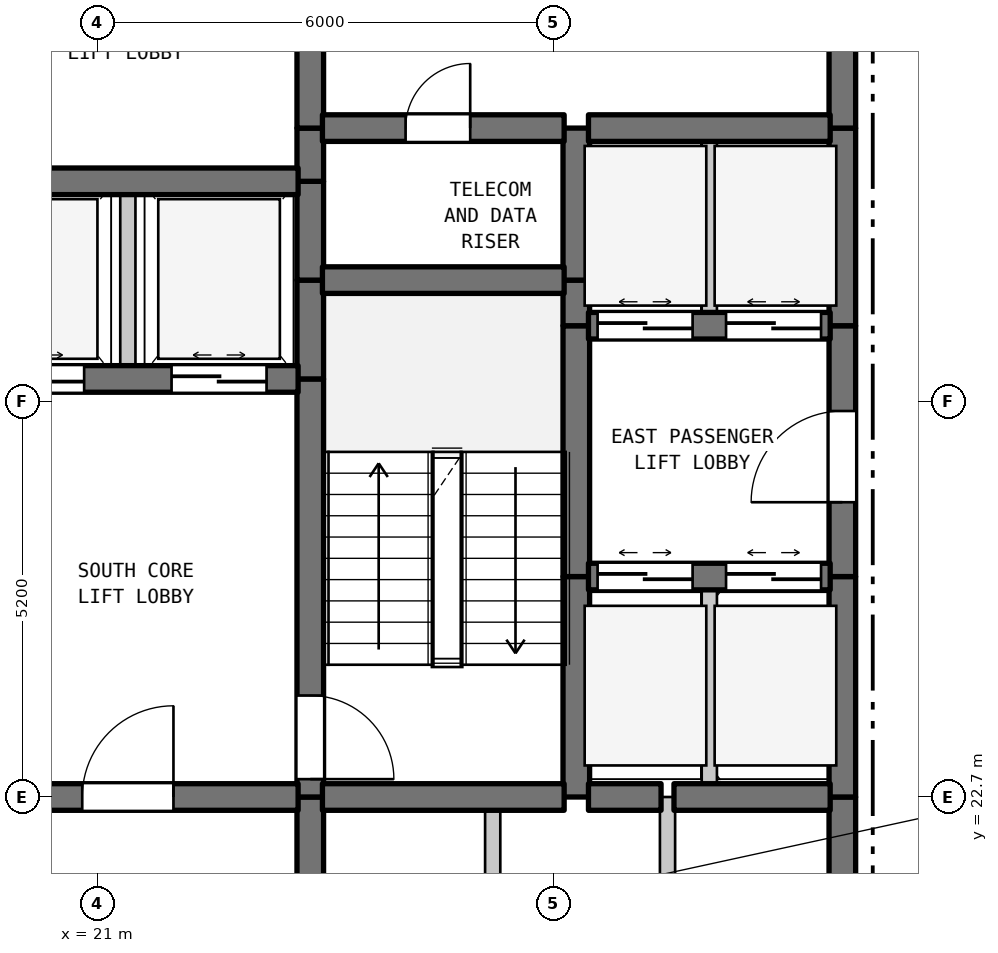
"""IFC4 building model, lengths in metres.
Left out: names, types, materials, properties, quantities, classifications, styles, units other than length and angle.
Written with IfcOpenShell. Run it as: python <this file> out.ifc"""

import sys

from ifc_helpers import new_model, si_unit, direction, frame, frame_2d, origin, place, context, subcontext, project, spatial, rectangle, extrude, element, fill, save


model = new_model("IFC4")
c1 = context("Model", 3, precision=1e-05, world=origin(), true_north=direction((0.0, 1.0)))
c2 = subcontext(c1, "Body", "Model", "MODEL_VIEW")
j1 = project(units=[si_unit("LENGTHUNIT", "METRE"), si_unit("PLANEANGLEUNIT", "RADIAN")], contexts=[c1])
p1 = place(None, origin())
s1 = spatial("IfcSite", under=j1, at=p1, CompositionType="ELEMENT")
p2 = place(p1, origin())
s2 = spatial("IfcBuilding", under=s1, at=p2, CompositionType="ELEMENT")
p3 = place(p2, frame((0.0, 0.0, 49.9)))
s3 = spatial("IfcBuildingStorey", under=s2, at=p3, CompositionType="ELEMENT", Elevation=49.9)
p4 = place(p3, frame((21.4, 28.2, 0.0), z_axis=(0.0, 0.0, 1.0), x_axis=(0.0, 1.0, 0.0)))
e1 = element("IfcWall", 1, at=p4, inside=s3, PredefinedType="STANDARD", context=c2, shape_type="SweptSolid", body=[
    extrude(rectangle(XDim=2.6, YDim=0.2, at=frame_2d((1.3, 0.0))), origin(), (0.0, 0.0, 1.0), 3.385),
])
p5 = place(p3, frame((23.8, 19.5, 0.0), z_axis=(0.0, 0.0, 1.0), x_axis=(0.0, 1.0, 0.0)))
e2 = element("IfcWall", 2, at=p5, inside=s3, PredefinedType="SHEAR", context=c2, shape_type="SweptSolid", body=[
    extrude(rectangle(XDim=3.2, YDim=0.35, at=frame_2d((1.6, 0.0))), origin(), (0.0, 0.0, 1.0), 3.385),
])
p6 = place(p3, frame((23.8, 22.7, 0.0), z_axis=(0.0, 0.0, 1.0), x_axis=(0.0, 1.0, 0.0)))
e3 = element("IfcWall", 3, at=p6, inside=s3, PredefinedType="SHEAR", context=c2, shape_type="SweptSolid", body=[
    extrude(rectangle(XDim=5.5, YDim=0.35, at=frame_2d((2.75, 0.0))), origin(), (0.0, 0.0, 1.0), 3.385),
])
p7 = place(p6, frame((0.235, 0.0, 0.0)))
e4 = element("IfcOpeningElement", 4, at=p7, cuts=e3, PredefinedType="OPENING", context=c2, shape_type="SweptSolid", body=[
    extrude(rectangle(XDim=1.1, YDim=2.15, at=frame_2d((0.55, 1.075))), frame((0.0, 0.185, 0.0), z_axis=(0.0, -1.0, 0.0), x_axis=(1.0, 0.0, 0.0)), (0.0, 0.0, 1.0), 0.37),
])
for number, where, z_axis, x_axis in (
    (5, (23.8, 28.2, 0.0), (0.0, 0.0, 1.0), (0.0, 1.0, 0.0)),
    (6, (23.8, 29.5, 0.0), (0.0, 0.0, 1.0), (0.0, 1.0, 0.0)),
):
    element("IfcWall", number, at=place(p3, frame(where, z_axis=z_axis, x_axis=x_axis)), inside=s3, PredefinedType="SHEAR", context=c2, shape_type="SweptSolid", body=[
        extrude(rectangle(XDim=1.3, YDim=0.35, at=frame_2d((0.65, 0.0))), origin(), (0.0, 0.0, 1.0), 3.385),
    ])
p8 = place(p3, frame((23.8, 30.8, 0.0), z_axis=(0.0, 0.0, 1.0), x_axis=(0.0, 1.0, 0.0)))
e7 = element("IfcWall", 7, at=p8, inside=s3, PredefinedType="SHEAR", context=c2, shape_type="SweptSolid", body=[
    extrude(rectangle(XDim=0.7, YDim=0.35, at=frame_2d((0.35, 0.0))), origin(), (0.0, 0.0, 1.0), 3.385),
])
p9 = place(p3, frame((23.8, 31.5, 0.0), z_axis=(0.0, 0.0, 1.0), x_axis=(0.0, 1.0, 0.0)))
e8 = element("IfcWall", 8, at=p9, inside=s3, PredefinedType="SHEAR", context=c2, shape_type="SweptSolid", body=[
    extrude(rectangle(XDim=3.5, YDim=0.35, at=frame_2d((1.75, 0.0))), origin(), (0.0, 0.0, 1.0), 3.385),
])
p10 = place(p9, frame((1.127, 0.0, 0.0)))
e9 = element("IfcOpeningElement", 9, at=p10, cuts=e8, PredefinedType="OPENING", context=c2, shape_type="SweptSolid", body=[
    extrude(rectangle(XDim=1.1, YDim=2.15, at=frame_2d((0.55, 1.075))), frame((0.0, 0.185, 0.0), z_axis=(0.0, -1.0, 0.0), x_axis=(1.0, 0.0, 0.0)), (0.0, 0.0, 1.0), 0.37),
])
p11 = place(p3, frame((26.2, 19.5, 0.0), z_axis=(0.0, 0.0, 1.0), x_axis=(0.0, 1.0, 0.0)))
e10 = element("IfcWall", 10, at=p11, inside=s3, PredefinedType="STANDARD", context=c2, shape_type="SweptSolid", body=[
    extrude(rectangle(XDim=3.2, YDim=0.2, at=frame_2d((1.6, 0.0))), origin(), (0.0, 0.0, 1.0), 3.385),
])
p12 = place(p3, frame((27.3, 22.7, 0.0), z_axis=(0.0, 0.0, 1.0), x_axis=(0.0, 1.0, 0.0)))
e11 = element("IfcWall", 11, at=p12, inside=s3, PredefinedType="SHEAR", context=c2, shape_type="SweptSolid", body=[
    extrude(rectangle(XDim=2.9, YDim=0.35, at=frame_2d((1.45, 0.0))), origin(), (0.0, 0.0, 1.0), 3.385),
])
p13 = place(p3, frame((27.3, 25.6, 0.0), z_axis=(0.0, 0.0, 1.0), x_axis=(0.0, 1.0, 0.0)))
e12 = element("IfcWall", 12, at=p13, inside=s3, PredefinedType="SHEAR", context=c2, shape_type="SweptSolid", body=[
    extrude(rectangle(XDim=3.3, YDim=0.35, at=frame_2d((1.65, 0.0))), origin(), (0.0, 0.0, 1.0), 3.385),
])
p14 = place(p3, frame((27.3, 28.9, 0.0), z_axis=(0.0, 0.0, 1.0), x_axis=(0.0, 1.0, 0.0)))
e13 = element("IfcWall", 13, at=p14, inside=s3, PredefinedType="SHEAR", context=c2, shape_type="SweptSolid", body=[
    extrude(rectangle(XDim=0.6, YDim=0.35, at=frame_2d((0.3, 0.0))), origin(), (0.0, 0.0, 1.0), 3.385),
])
p15 = place(p3, frame((27.3, 29.5, 0.0), z_axis=(0.0, 0.0, 1.0), x_axis=(0.0, 1.0, 0.0)))
e14 = element("IfcWall", 14, at=p15, inside=s3, PredefinedType="SHEAR", context=c2, shape_type="SweptSolid", body=[
    extrude(rectangle(XDim=2.0, YDim=0.35, at=frame_2d((1.0, 0.0))), origin(), (0.0, 0.0, 1.0), 3.385),
])
p16 = place(p3, frame((28.5, 19.5, 0.0), z_axis=(0.0, 0.0, 1.0), x_axis=(0.0, 1.0, 0.0)))
e15 = element("IfcWall", 15, at=p16, inside=s3, PredefinedType="STANDARD", context=c2, shape_type="SweptSolid", body=[
    extrude(rectangle(XDim=3.2, YDim=0.2, at=frame_2d((1.6, 0.0))), origin(), (0.0, 0.0, 1.0), 3.385),
])
p17 = place(p3, frame((29.05, 22.7, 0.0), z_axis=(0.0, 0.0, 1.0), x_axis=(0.0, 1.0, 0.0)))
e16 = element("IfcWall", 16, at=p17, inside=s3, PredefinedType="STANDARD", context=c2, shape_type="SweptSolid", body=[
    extrude(rectangle(XDim=2.9, YDim=0.2, at=frame_2d((1.45, 0.0))), origin(), (0.0, 0.0, 1.0), 3.385),
])
p18 = place(p3, frame((29.05, 28.9, 0.0), z_axis=(0.0, 0.0, 1.0), x_axis=(0.0, 1.0, 0.0)))
e17 = element("IfcWall", 17, at=p18, inside=s3, PredefinedType="STANDARD", context=c2, shape_type="SweptSolid", body=[
    extrude(rectangle(XDim=2.6, YDim=0.2, at=frame_2d((1.3, 0.0))), origin(), (0.0, 0.0, 1.0), 3.385),
])
p19 = place(p3, frame((30.8, 19.65, 0.0), z_axis=(0.0, 0.0, 1.0), x_axis=(0.0, 1.0, 0.0)))
e18 = element("IfcWall", 18, at=p19, inside=s3, PredefinedType="SHEAR", context=c2, shape_type="SweptSolid", body=[
    extrude(rectangle(XDim=3.05, YDim=0.35, at=frame_2d((1.525, 0.0))), origin(), (0.0, 0.0, 1.0), 3.385),
])
p20 = place(p3, frame((30.8, 22.7, 0.0), z_axis=(0.0, 0.0, 1.0), x_axis=(0.0, 1.0, 0.0)))
e19 = element("IfcWall", 19, at=p20, inside=s3, PredefinedType="SHEAR", context=c2, shape_type="SweptSolid", body=[
    extrude(rectangle(XDim=2.9, YDim=0.35, at=frame_2d((1.45, 0.0))), origin(), (0.0, 0.0, 1.0), 3.385),
])
p21 = place(p3, frame((30.8, 25.6, 0.0), z_axis=(0.0, 0.0, 1.0), x_axis=(0.0, 1.0, 0.0)))
e20 = element("IfcWall", 20, at=p21, inside=s3, PredefinedType="SHEAR", context=c2, shape_type="SweptSolid", body=[
    extrude(rectangle(XDim=3.3, YDim=0.35, at=frame_2d((1.65, 0.0))), origin(), (0.0, 0.0, 1.0), 3.385),
])
p22 = place(p21, frame((0.978, 0.0, 0.0)))
e21 = element("IfcOpeningElement", 21, at=p22, cuts=e20, PredefinedType="OPENING", context=c2, shape_type="SweptSolid", body=[
    extrude(rectangle(XDim=1.2, YDim=2.2, at=frame_2d((0.6, 1.1))), frame((0.0, 0.185, 0.0), z_axis=(0.0, -1.0, 0.0), x_axis=(1.0, 0.0, 0.0)), (0.0, 0.0, 1.0), 0.37),
])
p23 = place(p3, frame((30.8, 28.9, 0.0), z_axis=(0.0, 0.0, 1.0), x_axis=(0.0, 1.0, 0.0)))
e22 = element("IfcWall", 22, at=p23, inside=s3, PredefinedType="SHEAR", context=c2, shape_type="SweptSolid", body=[
    extrude(rectangle(XDim=2.6, YDim=0.35, at=frame_2d((1.3, 0.0))), origin(), (0.0, 0.0, 1.0), 3.385),
])
p24 = place(p3, frame((30.8, 31.5, 0.0), z_axis=(0.0, 0.0, 1.0), x_axis=(0.0, 1.0, 0.0)))
e23 = element("IfcWall", 23, at=p24, inside=s3, PredefinedType="SHEAR", context=c2, shape_type="SweptSolid", body=[
    extrude(rectangle(XDim=3.5, YDim=0.35, at=frame_2d((1.75, 0.0))), origin(), (0.0, 0.0, 1.0), 3.385),
])
p25 = place(p24, frame((1.15, 0.0, 0.0)))
e24 = element("IfcOpeningElement", 24, at=p25, cuts=e23, PredefinedType="OPENING", context=c2, shape_type="SweptSolid", body=[
    extrude(rectangle(XDim=1.2, YDim=2.2, at=frame_2d((0.6, 1.1))), frame((0.0, 0.185, 0.0), z_axis=(0.0, -1.0, 0.0), x_axis=(1.0, 0.0, 0.0)), (0.0, 0.0, 1.0), 0.37),
])
p26 = place(p3, frame((19.16, 22.7, 0.0), z_axis=(0.0, 0.0, 1.0), x_axis=(1.0, 0.0, 0.0)))
e25 = element("IfcWall", 25, at=p26, inside=s3, PredefinedType="SHEAR", context=c2, shape_type="SweptSolid", body=[
    extrude(rectangle(XDim=4.48, YDim=0.35, at=frame_2d((2.24, 0.0))), origin(), (0.0, 0.0, 1.0), 3.385),
])
p27 = place(p26, frame((1.64, 0.0, 0.0)))
e26 = element("IfcOpeningElement", 26, at=p27, cuts=e25, PredefinedType="OPENING", context=c2, shape_type="SweptSolid", body=[
    extrude(rectangle(XDim=1.2, YDim=2.2, at=frame_2d((0.6, 1.1))), frame((0.0, 0.185, 0.0), z_axis=(0.0, -1.0, 0.0), x_axis=(1.0, 0.0, 0.0)), (0.0, 0.0, 1.0), 0.37),
])
p28 = place(p3, frame((23.96, 22.7, 0.0), z_axis=(0.0, 0.0, 1.0), x_axis=(1.0, 0.0, 0.0)))
e27 = element("IfcWall", 27, at=p28, inside=s3, PredefinedType="SHEAR", context=c2, shape_type="SweptSolid", body=[
    extrude(rectangle(XDim=3.18, YDim=0.35, at=frame_2d((1.59, 0.0))), origin(), (0.0, 0.0, 1.0), 3.385),
])
p29 = place(p3, frame((27.46, 22.7, 0.0), z_axis=(0.0, 0.0, 1.0), x_axis=(1.0, 0.0, 0.0)))
e28 = element("IfcWall", 28, at=p29, inside=s3, PredefinedType="SHEAR", context=c2, shape_type="SweptSolid", body=[
    extrude(rectangle(XDim=0.955, YDim=0.35, at=frame_2d((0.478, 0.0))), origin(), (0.0, 0.0, 1.0), 3.385),
])
p30 = place(p3, frame((28.585, 22.7, 0.0), z_axis=(0.0, 0.0, 1.0), x_axis=(1.0, 0.0, 0.0)))
e29 = element("IfcWall", 29, at=p30, inside=s3, PredefinedType="SHEAR", context=c2, shape_type="SweptSolid", body=[
    extrude(rectangle(XDim=2.055, YDim=0.35, at=frame_2d((1.027, 0.0))), origin(), (0.0, 0.0, 1.0), 3.385),
])
p31 = place(p3, frame((27.46, 25.6, 0.0), z_axis=(0.0, 0.0, 1.0), x_axis=(1.0, 0.0, 0.0)))
e30 = element("IfcWall", 30, at=p31, inside=s3, PredefinedType="SHEAR", context=c2, shape_type="SweptSolid", body=[
    extrude(rectangle(XDim=3.18, YDim=0.35, at=frame_2d((1.59, 0.0))), origin(), (0.0, 0.0, 1.0), 3.385),
])
p32 = place(p31, frame((0.12, 0.0, 0.0)))
e31 = element("IfcOpeningElement", 31, at=p32, cuts=e30, PredefinedType="OPENING", context=c2, shape_type="SweptSolid", body=[
    extrude(rectangle(XDim=1.25, YDim=2.2, at=frame_2d((0.625, 1.1))), frame((0.0, 0.185, 0.0), z_axis=(0.0, -1.0, 0.0), x_axis=(1.0, 0.0, 0.0)), (0.0, 0.0, 1.0), 0.37),
])
p33 = place(p31, frame((1.81, 0.0, 0.0)))
e32 = element("IfcOpeningElement", 32, at=p33, cuts=e30, PredefinedType="OPENING", context=c2, shape_type="SweptSolid", body=[
    extrude(rectangle(XDim=1.25, YDim=2.2, at=frame_2d((0.625, 1.1))), frame((0.0, 0.185, 0.0), z_axis=(0.0, -1.0, 0.0), x_axis=(1.0, 0.0, 0.0)), (0.0, 0.0, 1.0), 0.37),
])
p34 = place(p3, frame((19.16, 28.2, 0.0), z_axis=(0.0, 0.0, 1.0), x_axis=(1.0, 0.0, 0.0)))
e33 = element("IfcWall", 33, at=p34, inside=s3, PredefinedType="SHEAR", context=c2, shape_type="SweptSolid", body=[
    extrude(rectangle(XDim=4.48, YDim=0.35, at=frame_2d((2.24, 0.0))), origin(), (0.0, 0.0, 1.0), 3.385),
])
p35 = place(p34, frame((0.415, 0.0, 0.0)))
e34 = element("IfcOpeningElement", 34, at=p35, cuts=e33, PredefinedType="OPENING", context=c2, shape_type="SweptSolid", body=[
    extrude(rectangle(XDim=1.25, YDim=2.2, at=frame_2d((0.625, 1.1))), frame((0.0, 0.185, 0.0), z_axis=(0.0, -1.0, 0.0), x_axis=(1.0, 0.0, 0.0)), (0.0, 0.0, 1.0), 0.37),
])
p36 = place(p34, frame((2.815, 0.0, 0.0)))
e35 = element("IfcOpeningElement", 35, at=p36, cuts=e33, PredefinedType="OPENING", context=c2, shape_type="SweptSolid", body=[
    extrude(rectangle(XDim=1.25, YDim=2.2, at=frame_2d((0.625, 1.1))), frame((0.0, 0.185, 0.0), z_axis=(0.0, -1.0, 0.0), x_axis=(1.0, 0.0, 0.0)), (0.0, 0.0, 1.0), 0.37),
])
p37 = place(p3, frame((27.46, 28.9, 0.0), z_axis=(0.0, 0.0, 1.0), x_axis=(1.0, 0.0, 0.0)))
e36 = element("IfcWall", 36, at=p37, inside=s3, PredefinedType="SHEAR", context=c2, shape_type="SweptSolid", body=[
    extrude(rectangle(XDim=3.18, YDim=0.35, at=frame_2d((1.59, 0.0))), origin(), (0.0, 0.0, 1.0), 3.385),
])
p38 = place(p37, frame((0.12, 0.0, 0.0)))
e37 = element("IfcOpeningElement", 37, at=p38, cuts=e36, PredefinedType="OPENING", context=c2, shape_type="SweptSolid", body=[
    extrude(rectangle(XDim=1.25, YDim=2.2, at=frame_2d((0.625, 1.1))), frame((0.0, 0.185, 0.0), z_axis=(0.0, -1.0, 0.0), x_axis=(1.0, 0.0, 0.0)), (0.0, 0.0, 1.0), 0.37),
])
p39 = place(p37, frame((1.81, 0.0, 0.0)))
e38 = element("IfcOpeningElement", 38, at=p39, cuts=e36, PredefinedType="OPENING", context=c2, shape_type="SweptSolid", body=[
    extrude(rectangle(XDim=1.25, YDim=2.2, at=frame_2d((0.625, 1.1))), frame((0.0, 0.185, 0.0), z_axis=(0.0, -1.0, 0.0), x_axis=(1.0, 0.0, 0.0)), (0.0, 0.0, 1.0), 0.37),
])
p40 = place(p3, frame((23.96, 29.5, 0.0), z_axis=(0.0, 0.0, 1.0), x_axis=(1.0, 0.0, 0.0)))
e39 = element("IfcWall", 39, at=p40, inside=s3, PredefinedType="SHEAR", context=c2, shape_type="SweptSolid", body=[
    extrude(rectangle(XDim=3.18, YDim=0.35, at=frame_2d((1.59, 0.0))), origin(), (0.0, 0.0, 1.0), 3.385),
])
p41 = place(p3, frame((19.16, 30.8, 0.0), z_axis=(0.0, 0.0, 1.0), x_axis=(1.0, 0.0, 0.0)))
e40 = element("IfcWall", 40, at=p41, inside=s3, PredefinedType="SHEAR", context=c2, shape_type="SweptSolid", body=[
    extrude(rectangle(XDim=4.48, YDim=0.35, at=frame_2d((2.24, 0.0))), origin(), (0.0, 0.0, 1.0), 3.385),
])
p42 = place(p3, frame((23.96, 31.5, 0.0), z_axis=(0.0, 0.0, 1.0), x_axis=(1.0, 0.0, 0.0)))
e41 = element("IfcWall", 41, at=p42, inside=s3, PredefinedType="SHEAR", context=c2, shape_type="SweptSolid", body=[
    extrude(rectangle(XDim=3.18, YDim=0.35, at=frame_2d((1.59, 0.0))), origin(), (0.0, 0.0, 1.0), 3.385),
])
p43 = place(p42, frame((1.094, 0.0, 0.0)))
e42 = element("IfcOpeningElement", 42, at=p43, cuts=e41, PredefinedType="OPENING", context=c2, shape_type="SweptSolid", body=[
    extrude(rectangle(XDim=0.85, YDim=2.1, at=frame_2d((0.425, 1.05))), frame((0.0, 0.185, 0.0), z_axis=(0.0, -1.0, 0.0), x_axis=(1.0, 0.0, 0.0)), (0.0, 0.0, 1.0), 0.37),
])
p44 = place(p3, frame((27.46, 31.5, 0.0), z_axis=(0.0, 0.0, 1.0), x_axis=(1.0, 0.0, 0.0)))
e43 = element("IfcWall", 43, at=p44, inside=s3, PredefinedType="SHEAR", context=c2, shape_type="SweptSolid", body=[
    extrude(rectangle(XDim=3.18, YDim=0.35, at=frame_2d((1.59, 0.0))), origin(), (0.0, 0.0, 1.0), 3.385),
])
p45 = place(p7, frame((1.1, 0.0, 0.0), z_axis=(0.0, 0.0, 1.0), x_axis=(-1.0, 0.0, 0.0)))
e44 = element("IfcDoor", 44, at=p45, inside=s3, OperationType="SINGLE_SWING_LEFT", PredefinedType="DOOR", context=c2, shape_type="SweptSolid", body=[
    extrude(rectangle(XDim=1.1, YDim=2.15, at=frame_2d((0.55, 1.075))), frame((0.0, 0.025, 0.0), z_axis=(0.0, -1.0, 0.0), x_axis=(1.0, 0.0, 0.0)), (0.0, 0.0, 1.0), 0.05),
])
fill(e4, e44)
p46 = place(p22, origin())
e45 = element("IfcDoor", 45, at=p46, inside=s3, OperationType="SINGLE_SWING_LEFT", PredefinedType="DOOR", context=c2, shape_type="SweptSolid", body=[
    extrude(rectangle(XDim=1.2, YDim=2.2, at=frame_2d((0.6, 1.1))), frame((0.0, 0.025, 0.0), z_axis=(0.0, -1.0, 0.0), x_axis=(1.0, 0.0, 0.0)), (0.0, 0.0, 1.0), 0.05),
])
fill(e21, e45)
p47 = place(p27, origin())
e46 = element("IfcDoor", 46, at=p47, inside=s3, OperationType="SINGLE_SWING_RIGHT", PredefinedType="DOOR", context=c2, shape_type="SweptSolid", body=[
    extrude(rectangle(XDim=1.2, YDim=2.2, at=frame_2d((0.6, 1.1))), frame((0.0, 0.025, 0.0), z_axis=(0.0, -1.0, 0.0), x_axis=(1.0, 0.0, 0.0)), (0.0, 0.0, 1.0), 0.05),
])
fill(e26, e46)
p48 = place(p32, origin())
e47 = element("IfcDoor", 47, at=p48, inside=s3, OperationType="DOUBLE_DOOR_SLIDING", PredefinedType="DOOR", context=c2, shape_type="SweptSolid", body=[
    extrude(rectangle(XDim=1.25, YDim=2.2, at=frame_2d((0.625, 1.1))), frame((0.0, 0.025, 0.0), z_axis=(0.0, -1.0, 0.0), x_axis=(1.0, 0.0, 0.0)), (0.0, 0.0, 1.0), 0.05),
])
fill(e31, e47)
p49 = place(p33, origin())
e48 = element("IfcDoor", 48, at=p49, inside=s3, OperationType="DOUBLE_DOOR_SLIDING", PredefinedType="DOOR", context=c2, shape_type="SweptSolid", body=[
    extrude(rectangle(XDim=1.25, YDim=2.2, at=frame_2d((0.625, 1.1))), frame((0.0, 0.025, 0.0), z_axis=(0.0, -1.0, 0.0), x_axis=(1.0, 0.0, 0.0)), (0.0, 0.0, 1.0), 0.05),
])
fill(e32, e48)
p50 = place(p35, origin())
e49 = element("IfcDoor", 49, at=p50, inside=s3, OperationType="DOUBLE_DOOR_SLIDING", PredefinedType="DOOR", context=c2, shape_type="SweptSolid", body=[
    extrude(rectangle(XDim=1.25, YDim=2.2, at=frame_2d((0.625, 1.1))), frame((0.0, 0.025, 0.0), z_axis=(0.0, -1.0, 0.0), x_axis=(1.0, 0.0, 0.0)), (0.0, 0.0, 1.0), 0.05),
])
fill(e34, e49)
p51 = place(p36, origin())
e50 = element("IfcDoor", 50, at=p51, inside=s3, OperationType="DOUBLE_DOOR_SLIDING", PredefinedType="DOOR", context=c2, shape_type="SweptSolid", body=[
    extrude(rectangle(XDim=1.25, YDim=2.2, at=frame_2d((0.625, 1.1))), frame((0.0, 0.025, 0.0), z_axis=(0.0, -1.0, 0.0), x_axis=(1.0, 0.0, 0.0)), (0.0, 0.0, 1.0), 0.05),
])
fill(e35, e50)
p52 = place(p38, origin())
e51 = element("IfcDoor", 51, at=p52, inside=s3, OperationType="DOUBLE_DOOR_SLIDING", PredefinedType="DOOR", context=c2, shape_type="SweptSolid", body=[
    extrude(rectangle(XDim=1.25, YDim=2.2, at=frame_2d((0.625, 1.1))), frame((0.0, 0.025, 0.0), z_axis=(0.0, -1.0, 0.0), x_axis=(1.0, 0.0, 0.0)), (0.0, 0.0, 1.0), 0.05),
])
fill(e37, e51)
p53 = place(p39, origin())
e52 = element("IfcDoor", 52, at=p53, inside=s3, OperationType="DOUBLE_DOOR_SLIDING", PredefinedType="DOOR", context=c2, shape_type="SweptSolid", body=[
    extrude(rectangle(XDim=1.25, YDim=2.2, at=frame_2d((0.625, 1.1))), frame((0.0, 0.025, 0.0), z_axis=(0.0, -1.0, 0.0), x_axis=(1.0, 0.0, 0.0)), (0.0, 0.0, 1.0), 0.05),
])
fill(e38, e52)
p54 = place(p43, origin())
e53 = element("IfcDoor", 53, at=p54, inside=s3, OperationType="SINGLE_SWING_RIGHT", PredefinedType="DOOR", context=c2, shape_type="SweptSolid", body=[
    extrude(rectangle(XDim=0.85, YDim=2.1, at=frame_2d((0.425, 1.05))), frame((0.0, 0.025, 0.0), z_axis=(0.0, -1.0, 0.0), x_axis=(1.0, 0.0, 0.0)), (0.0, 0.0, 1.0), 0.05),
])
fill(e42, e53)
save(model, sys.argv[1])
